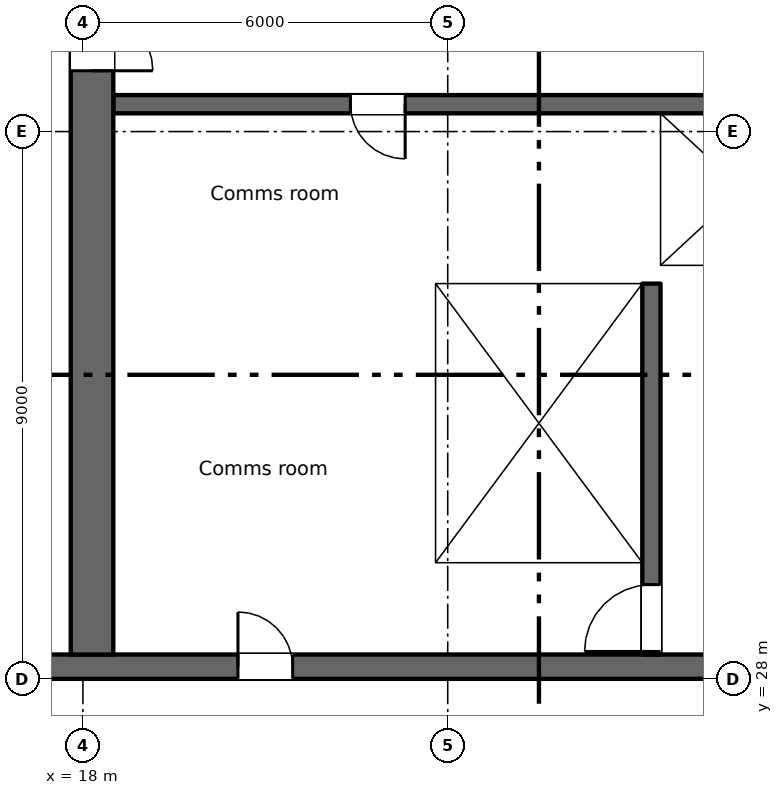
"""IFC4 building model, lengths in metres.
Left out: names, types, materials, properties, quantities, classifications, styles, units other than length and angle.
Written with IfcOpenShell. Run it as: python <this file> out.ifc"""

import sys

from ifc_helpers import new_model, si_unit, direction, frame, frame_2d, origin, place, context, subcontext, project, spatial, rectangle, extrude, element, fill, save


model = new_model("IFC4")
c1 = context("Model", 3, precision=1e-05, world=origin(), true_north=direction((0.0, 1.0)))
c2 = subcontext(c1, "Body", "Model", "MODEL_VIEW")
j1 = project(units=[si_unit("LENGTHUNIT", "METRE"), si_unit("PLANEANGLEUNIT", "RADIAN")], contexts=[c1])
p1 = place(None, origin())
s1 = spatial("IfcSite", under=j1, at=p1, CompositionType="ELEMENT")
p2 = place(p1, origin())
s2 = spatial("IfcBuilding", under=s1, at=p2, CompositionType="ELEMENT")
p3 = place(p2, frame((0.0, 0.0, 193.0)))
s3 = spatial("IfcBuildingStorey", under=s2, at=p3, CompositionType="ELEMENT", Elevation=193.0)
p4 = place(p3, frame((6.6, 28.2, 0.0), z_axis=(0.0, 0.0, 1.0), x_axis=(1.0, 0.0, 0.0)))
e1 = element("IfcWall", 1, at=p4, inside=s3, PredefinedType="SHEAR", context=c2, shape_type="SweptSolid", body=[
    extrude(rectangle(XDim=57.9, YDim=0.4, at=frame_2d((28.95, 0.0))), origin(), (0.0, 0.0, 1.0), 3.35),
])
p5 = place(p4, frame((13.95, 0.0, 0.0)))
e2 = element("IfcOpeningElement", 2, at=p5, cuts=e1, PredefinedType="OPENING", context=c2, shape_type="SweptSolid", body=[
    extrude(rectangle(XDim=0.9, YDim=2.1, at=frame_2d((0.45, 1.05))), frame((0.0, 0.21, 0.0), z_axis=(0.0, -1.0, 0.0), x_axis=(1.0, 0.0, 0.0)), (0.0, 0.0, 1.0), 0.42),
])
p6 = place(p4, frame((48.663, 0.0, 0.0)))
e3 = element("IfcOpeningElement", 3, at=p6, cuts=e1, PredefinedType="OPENING", context=c2, shape_type="SweptSolid", body=[
    extrude(rectangle(XDim=0.9, YDim=2.1, at=frame_2d((0.45, 1.05))), frame((0.0, 0.21, 0.0), z_axis=(0.0, -1.0, 0.0), x_axis=(1.0, 0.0, 0.0)), (0.0, 0.0, 1.0), 0.42),
])
p7 = place(p4, frame((51.238, 0.0, 0.0)))
e4 = element("IfcOpeningElement", 4, at=p7, cuts=e1, PredefinedType="OPENING", context=c2, shape_type="SweptSolid", body=[
    extrude(rectangle(XDim=0.9, YDim=2.1, at=frame_2d((0.45, 1.05))), frame((0.0, 0.21, 0.0), z_axis=(0.0, -1.0, 0.0), x_axis=(1.0, 0.0, 0.0)), (0.0, 0.0, 1.0), 0.42),
])
p8 = place(p4, frame((1.45, 0.0, 0.0)))
e5 = element("IfcOpeningElement", 5, at=p8, cuts=e1, PredefinedType="OPENING", context=c2, shape_type="SweptSolid", body=[
    extrude(rectangle(XDim=0.9, YDim=2.1, at=frame_2d((0.45, 1.05))), frame((0.0, 0.21, 0.0), z_axis=(0.0, -1.0, 0.0), x_axis=(1.0, 0.0, 0.0)), (0.0, 0.0, 1.0), 0.42),
])
p9 = place(p4, frame((4.8, 0.0, 0.0)))
e6 = element("IfcOpeningElement", 6, at=p9, cuts=e1, PredefinedType="OPENING", context=c2, shape_type="SweptSolid", body=[
    extrude(rectangle(XDim=1.2, YDim=2.1, at=frame_2d((0.6, 1.05))), frame((0.0, 0.21, 0.0), z_axis=(0.0, -1.0, 0.0), x_axis=(1.0, 0.0, 0.0)), (0.0, 0.0, 1.0), 0.42),
])
p10 = place(p4, frame((31.8, 0.0, 0.0)))
e7 = element("IfcOpeningElement", 7, at=p10, cuts=e1, PredefinedType="OPENING", context=c2, shape_type="SweptSolid", body=[
    extrude(rectangle(XDim=1.2, YDim=2.1, at=frame_2d((0.6, 1.05))), frame((0.0, 0.21, 0.0), z_axis=(0.0, -1.0, 0.0), x_axis=(1.0, 0.0, 0.0)), (0.0, 0.0, 1.0), 0.42),
])
p11 = place(p4, frame((55.3, 0.0, 0.0)))
e8 = element("IfcOpeningElement", 8, at=p11, cuts=e1, PredefinedType="OPENING", context=c2, shape_type="SweptSolid", body=[
    extrude(rectangle(XDim=1.2, YDim=2.1, at=frame_2d((0.6, 1.05))), frame((0.0, 0.21, 0.0), z_axis=(0.0, -1.0, 0.0), x_axis=(1.0, 0.0, 0.0)), (0.0, 0.0, 1.0), 0.42),
])
p12 = place(p4, frame((21.8, 0.0, 0.0)))
e9 = element("IfcOpeningElement", 9, at=p12, cuts=e1, PredefinedType="OPENING", context=c2, shape_type="SweptSolid", body=[
    extrude(rectangle(XDim=1.2, YDim=2.1, at=frame_2d((0.6, 1.05))), frame((0.0, 0.21, 0.0), z_axis=(0.0, -1.0, 0.0), x_axis=(1.0, 0.0, 0.0)), (0.0, 0.0, 1.0), 0.42),
])
p13 = place(p4, frame((41.8, 0.0, 0.0)))
e10 = element("IfcOpeningElement", 10, at=p13, cuts=e1, PredefinedType="OPENING", context=c2, shape_type="SweptSolid", body=[
    extrude(rectangle(XDim=1.2, YDim=2.1, at=frame_2d((0.6, 1.05))), frame((0.0, 0.21, 0.0), z_axis=(0.0, -1.0, 0.0), x_axis=(1.0, 0.0, 0.0)), (0.0, 0.0, 1.0), 0.42),
])
p14 = place(p4, frame((24.95, 0.0, 0.0)))
e11 = element("IfcOpeningElement", 11, at=p14, cuts=e1, PredefinedType="OPENING", context=c2, shape_type="SweptSolid", body=[
    extrude(rectangle(XDim=2.4, YDim=2.1, at=frame_2d((1.2, 1.05))), frame((0.0, 0.21, 0.0), z_axis=(0.0, -1.0, 0.0), x_axis=(1.0, 0.0, 0.0)), (0.0, 0.0, 1.0), 0.42),
])
p15 = place(p4, frame((37.45, 0.0, 0.0)))
e12 = element("IfcOpeningElement", 12, at=p15, cuts=e1, PredefinedType="OPENING", context=c2, shape_type="SweptSolid", body=[
    extrude(rectangle(XDim=2.4, YDim=2.1, at=frame_2d((1.2, 1.05))), frame((0.0, 0.21, 0.0), z_axis=(0.0, -1.0, 0.0), x_axis=(1.0, 0.0, 0.0)), (0.0, 0.0, 1.0), 0.42),
])
p16 = place(p4, frame((8.1, 0.0, 0.0)))
e13 = element("IfcOpeningElement", 13, at=p16, cuts=e1, PredefinedType="OPENING", context=c2, shape_type="SweptSolid", body=[
    extrude(rectangle(XDim=2.4, YDim=2.1, at=frame_2d((1.2, 1.05))), frame((0.0, 0.21, 0.0), z_axis=(0.0, -1.0, 0.0), x_axis=(1.0, 0.0, 0.0)), (0.0, 0.0, 1.0), 0.42),
])
p17 = place(p4, frame((28.95, 0.0, 0.0)))
e14 = element("IfcOpeningElement", 14, at=p17, cuts=e1, PredefinedType="OPENING", context=c2, shape_type="SweptSolid", body=[
    extrude(rectangle(XDim=0.9, YDim=2.1, at=frame_2d((0.45, 1.05))), frame((0.0, 0.21, 0.0), z_axis=(0.0, -1.0, 0.0), x_axis=(1.0, 0.0, 0.0)), (0.0, 0.0, 1.0), 0.42),
])
p18 = place(p4, frame((34.95, 0.0, 0.0)))
e15 = element("IfcOpeningElement", 15, at=p18, cuts=e1, PredefinedType="OPENING", context=c2, shape_type="SweptSolid", body=[
    extrude(rectangle(XDim=0.9, YDim=2.1, at=frame_2d((0.45, 1.05))), frame((0.0, 0.21, 0.0), z_axis=(0.0, -1.0, 0.0), x_axis=(1.0, 0.0, 0.0)), (0.0, 0.0, 1.0), 0.42),
])
p19 = place(p3, frame((18.15, 28.4, 0.0), z_axis=(0.0, 0.0, 1.0), x_axis=(0.0, 1.0, 0.0)))
e16 = element("IfcWall", 16, at=p19, inside=s3, PredefinedType="SHEAR", context=c2, shape_type="SweptSolid", body=[
    extrude(rectangle(XDim=16.9, YDim=0.7, at=frame_2d((8.45, 0.0))), origin(), (0.0, 0.0, 1.0), 3.35),
])
p20 = place(p19, frame((9.6, 0.0, 0.0)))
e17 = element("IfcOpeningElement", 17, at=p20, cuts=e16, PredefinedType="OPENING", context=c2, shape_type="SweptSolid", body=[
    extrude(rectangle(XDim=2.0, YDim=2.1, at=frame_2d((1.0, 1.05))), frame((0.0, 0.36, 0.0), z_axis=(0.0, -1.0, 0.0), x_axis=(1.0, 0.0, 0.0)), (0.0, 0.0, 1.0), 0.72),
])
p21 = place(p19, frame((15.4, 0.0, 0.0)))
e18 = element("IfcOpeningElement", 18, at=p21, cuts=e16, PredefinedType="OPENING", context=c2, shape_type="SweptSolid", body=[
    extrude(rectangle(XDim=1.2, YDim=2.1, at=frame_2d((0.6, 1.05))), frame((0.0, 0.36, 0.0), z_axis=(0.0, -1.0, 0.0), x_axis=(1.0, 0.0, 0.0)), (0.0, 0.0, 1.0), 0.72),
])
p22 = place(p3, frame((23.65, 28.4, 0.0), z_axis=(0.0, 0.0, 1.0), x_axis=(0.0, 1.0, 0.0)))
e19 = element("IfcWall", 19, at=p22, inside=s3, PredefinedType="SHEAR", context=c2, shape_type="SweptSolid", body=[
    extrude(rectangle(XDim=6.1, YDim=0.3, at=frame_2d((3.05, 0.0))), origin(), (0.0, 0.0, 1.0), 3.35),
])
p23 = place(p3, frame((27.35, 28.4, 0.0), z_axis=(0.0, 0.0, 1.0), x_axis=(0.0, 1.0, 0.0)))
e20 = element("IfcWall", 20, at=p23, inside=s3, PredefinedType="SHEAR", context=c2, shape_type="SweptSolid", body=[
    extrude(rectangle(XDim=6.1, YDim=0.3, at=frame_2d((3.05, 0.0))), origin(), (0.0, 0.0, 1.0), 3.35),
])
p24 = place(p23, frame((0.05, 0.0, 0.0)))
e21 = element("IfcOpeningElement", 21, at=p24, cuts=e20, PredefinedType="OPENING", context=c2, shape_type="SweptSolid", body=[
    extrude(rectangle(XDim=1.1, YDim=2.1, at=frame_2d((0.55, 1.05))), frame((0.0, 0.16, 0.0), z_axis=(0.0, -1.0, 0.0), x_axis=(1.0, 0.0, 0.0)), (0.0, 0.0, 1.0), 0.32),
])
p25 = place(p3, frame((18.5, 34.65, 0.0), z_axis=(0.0, 0.0, 1.0), x_axis=(1.0, 0.0, 0.0)))
e22 = element("IfcWall", 22, at=p25, inside=s3, PredefinedType="SHEAR", context=c2, shape_type="SweptSolid", body=[
    extrude(rectangle(XDim=12.2, YDim=0.3, at=frame_2d((6.1, 0.0))), origin(), (0.0, 0.0, 1.0), 3.35),
])
p26 = place(p25, frame((9.8, 0.0, 0.0)))
e23 = element("IfcOpeningElement", 23, at=p26, cuts=e22, PredefinedType="OPENING", context=c2, shape_type="SweptSolid", body=[
    extrude(rectangle(XDim=1.1, YDim=2.1, at=frame_2d((0.55, 1.05))), frame((0.0, 0.16, 0.0), z_axis=(0.0, -1.0, 0.0), x_axis=(1.0, 0.0, 0.0)), (0.0, 0.0, 1.0), 0.32),
])
p27 = place(p3, frame((30.7, 37.45, 0.0), z_axis=(0.0, 0.0, 1.0), x_axis=(-1.0, 0.0, 0.0)))
e24 = element("IfcWall", 24, at=p27, inside=s3, PredefinedType="SHEAR", context=c2, shape_type="SweptSolid", body=[
    extrude(rectangle(XDim=12.2, YDim=0.3, at=frame_2d((6.1, 0.0))), origin(), (0.0, 0.0, 1.0), 3.35),
])
p28 = place(p27, frame((7.4, 0.0, 0.0)))
e25 = element("IfcOpeningElement", 25, at=p28, cuts=e24, PredefinedType="OPENING", context=c2, shape_type="SweptSolid", body=[
    extrude(rectangle(XDim=0.9, YDim=2.1, at=frame_2d((0.45, 1.05))), frame((0.0, 0.16, 0.0), z_axis=(0.0, -1.0, 0.0), x_axis=(1.0, 0.0, 0.0)), (0.0, 0.0, 1.0), 0.32),
])
p29 = place(p3, frame((27.35, 34.8, 0.0), z_axis=(0.0, 0.0, 1.0), x_axis=(0.0, 1.0, 0.0)))
e26 = element("IfcWall", 26, at=p29, inside=s3, PredefinedType="SHEAR", context=c2, shape_type="SweptSolid", body=[
    extrude(rectangle(XDim=2.5, YDim=0.3, at=frame_2d((1.25, 0.0))), origin(), (0.0, 0.0, 1.0), 3.35),
])
p30 = place(p5, origin())
e27 = element("IfcDoor", 27, at=p30, inside=s3, OperationType="SINGLE_SWING_LEFT", PredefinedType="DOOR", context=c2, shape_type="SweptSolid", body=[
    extrude(rectangle(XDim=0.9, YDim=2.1, at=frame_2d((0.45, 1.05))), frame((0.0, 0.025, 0.0), z_axis=(0.0, -1.0, 0.0), x_axis=(1.0, 0.0, 0.0)), (0.0, 0.0, 1.0), 0.05),
])
fill(e2, e27)
p31 = place(p28, origin())
e28 = element("IfcDoor", 28, at=p31, inside=s3, OperationType="SINGLE_SWING_LEFT", PredefinedType="DOOR", context=c2, shape_type="SweptSolid", body=[
    extrude(rectangle(XDim=0.9, YDim=2.1, at=frame_2d((0.45, 1.05))), frame((0.0, 0.025, 0.0), z_axis=(0.0, -1.0, 0.0), x_axis=(1.0, 0.0, 0.0)), (0.0, 0.0, 1.0), 0.05),
])
fill(e25, e28)
p32 = place(p24, origin())
e29 = element("IfcDoor", 29, at=p32, inside=s3, OperationType="SINGLE_SWING_LEFT", PredefinedType="DOOR", context=c2, shape_type="SweptSolid", body=[
    extrude(rectangle(XDim=1.1, YDim=2.1, at=frame_2d((0.55, 1.05))), frame((0.0, 0.025, 0.0), z_axis=(0.0, -1.0, 0.0), x_axis=(1.0, 0.0, 0.0)), (0.0, 0.0, 1.0), 0.05),
])
fill(e21, e29)
p33 = place(p20, origin())
e30 = element("IfcDoor", 30, at=p33, inside=s3, OperationType="DOUBLE_DOOR_SINGLE_SWING", PredefinedType="DOOR", context=c2, shape_type="SweptSolid", body=[
    extrude(rectangle(XDim=2.0, YDim=2.1, at=frame_2d((1.0, 1.05))), frame((0.0, 0.025, 0.0), z_axis=(0.0, -1.0, 0.0), x_axis=(1.0, 0.0, 0.0)), (0.0, 0.0, 1.0), 0.05),
])
fill(e17, e30)
save(model, sys.argv[1])
